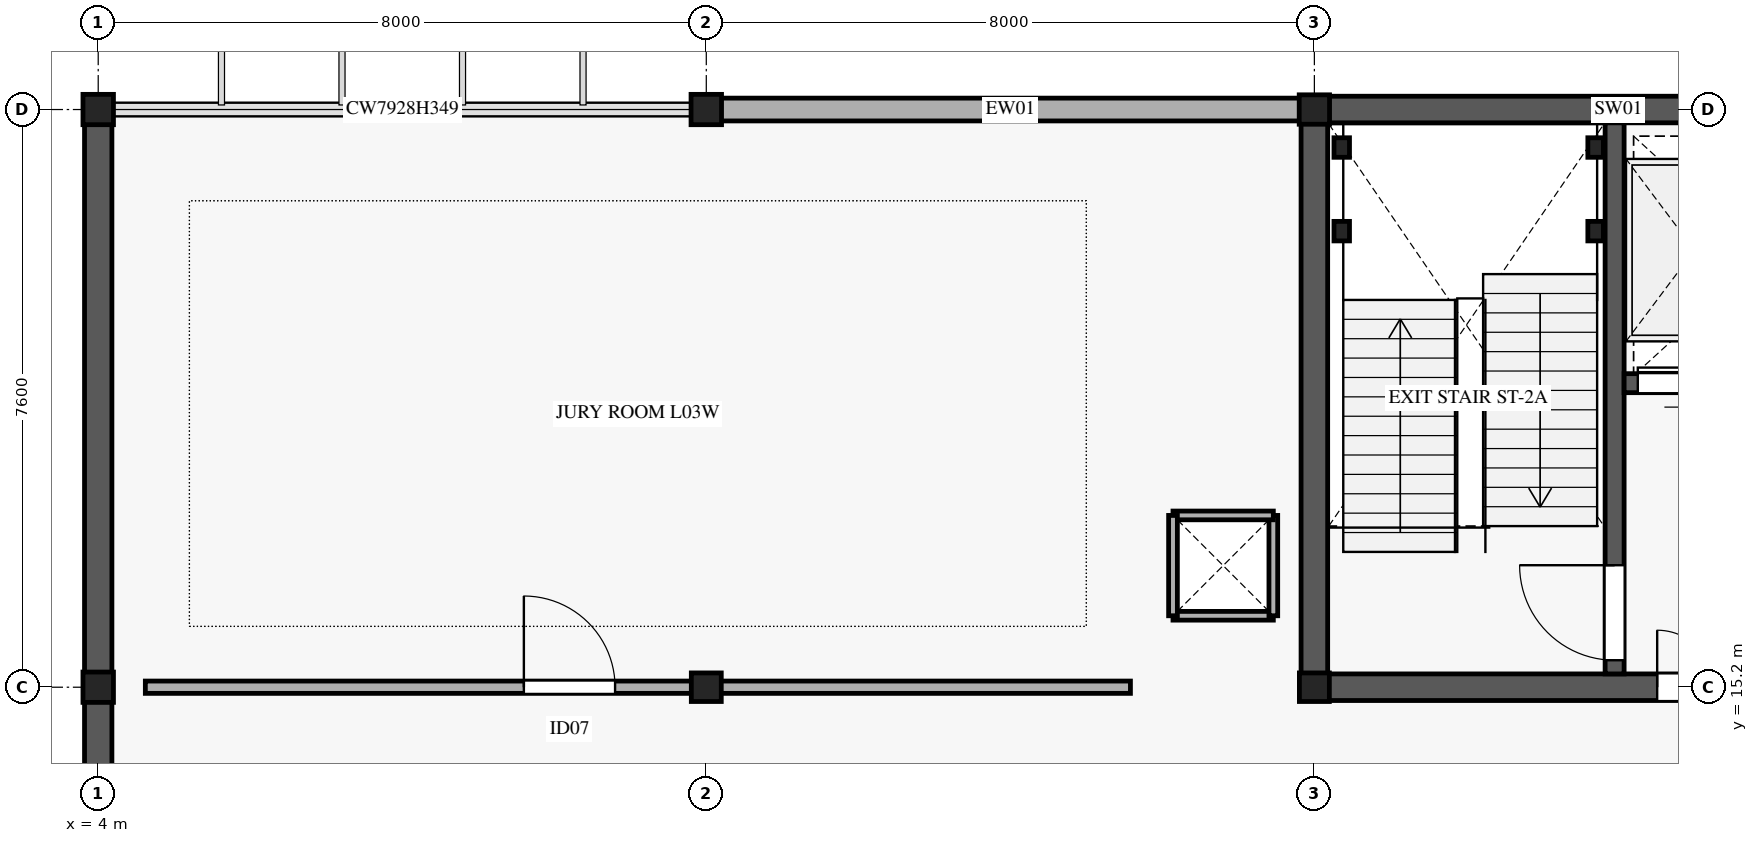
"""IFC4 building model, lengths in metres.
Left out: names, types, materials, properties, quantities, classifications, styles, units other than length and angle.
Written with IfcOpenShell. Run it as: python <this file> out.ifc"""

import sys

from ifc_helpers import new_model, si_unit, direction, frame, frame_2d, origin, origin_2d, place, context, subcontext, project, spatial, rectangle, i_section, extrude, element, fill, save


model = new_model("IFC4")
c1 = context("Model", 3, precision=1e-05, world=origin(), true_north=direction((0.0, 1.0)))
c2 = subcontext(c1, "Body", "Model", "MODEL_VIEW")
j1 = project(units=[si_unit("LENGTHUNIT", "METRE"), si_unit("PLANEANGLEUNIT", "RADIAN")], contexts=[c1])
p1 = place(None, origin())
s1 = spatial("IfcSite", under=j1, at=p1, CompositionType="ELEMENT")
p2 = place(p1, origin())
s2 = spatial("IfcBuilding", under=s1, at=p2, CompositionType="ELEMENT")
p3 = place(p2, frame((0.0, 0.0, 15.6)))
s3 = spatial("IfcBuildingStorey", under=s2, at=p3, CompositionType="ELEMENT", Elevation=15.6)
for number, where, z_axis, x_axis in (
    (1, (4.0, 15.2, 0.0), (0.0, 0.0, 1.0), (1.0, 0.0, 0.0)),
    (2, (4.0, 22.8, 0.0), (0.0, 0.0, 1.0), (1.0, 0.0, 0.0)),
):
    element("IfcColumn", number, at=place(p3, frame(where, z_axis=z_axis, x_axis=x_axis)), inside=s3, PredefinedType="COLUMN", context=c2, shape_type="SweptSolid", body=[
        extrude(i_section(OverallWidth=0.401, OverallDepth=0.399, WebThickness=0.025, FlangeThickness=0.04, FilletRadius=0.015, at=origin_2d()), origin(), (0.0, 0.0, 1.0), 4.59),
    ])
p4 = place(p3, frame((12.0, 15.2, 0.0), z_axis=(0.0, 0.0, 1.0), x_axis=(1.0, 0.0, 0.0)))
e3 = element("IfcColumn", 3, at=p4, inside=s3, PredefinedType="COLUMN", context=c2, shape_type="SweptSolid", body=[
    extrude(i_section(OverallWidth=0.394, OverallDepth=0.376, WebThickness=0.017, FlangeThickness=0.028, FilletRadius=0.015, at=origin_2d()), origin(), (0.0, 0.0, 1.0), 4.59),
])
p5 = place(p3, frame((12.0, 22.8, 0.0), z_axis=(0.0, 0.0, 1.0), x_axis=(1.0, 0.0, 0.0)))
e4 = element("IfcColumn", 4, at=p5, inside=s3, PredefinedType="COLUMN", context=c2, shape_type="SweptSolid", body=[
    extrude(i_section(OverallWidth=0.401, OverallDepth=0.399, WebThickness=0.025, FlangeThickness=0.04, FilletRadius=0.015, at=origin_2d()), origin(), (0.0, 0.0, 1.0), 4.59),
])
p6 = place(p3, frame((20.0, 15.2, 0.0), z_axis=(0.0, 0.0, 1.0), x_axis=(1.0, 0.0, 0.0)))
e5 = element("IfcColumn", 5, at=p6, inside=s3, PredefinedType="COLUMN", context=c2, shape_type="SweptSolid", body=[
    extrude(i_section(OverallWidth=0.394, OverallDepth=0.376, WebThickness=0.017, FlangeThickness=0.028, FilletRadius=0.015, at=origin_2d()), origin(), (0.0, 0.0, 1.0), 4.59),
])
p7 = place(p3, frame((20.0, 22.8, 0.0), z_axis=(0.0, 0.0, 1.0), x_axis=(1.0, 0.0, 0.0)))
e6 = element("IfcColumn", 6, at=p7, inside=s3, PredefinedType="COLUMN", context=c2, shape_type="SweptSolid", body=[
    extrude(i_section(OverallWidth=0.399, OverallDepth=0.387, WebThickness=0.021, FlangeThickness=0.033, FilletRadius=0.015, at=origin_2d()), origin(), (0.0, 0.0, 1.0), 4.59),
])
p8 = place(p3, frame((4.0, 7.58, 0.0), z_axis=(0.0, 0.0, 1.0), x_axis=(0.0, 1.0, 0.0)))
e7 = element("IfcWall", 7, at=p8, inside=s3, PredefinedType="STANDARD", context=c2, shape_type="SweptSolid", body=[
    extrude(rectangle(XDim=7.64, YDim=0.36, at=frame_2d((3.82, 0.0))), origin(), (0.0, 0.0, 1.0), 4.6),
])
p9 = place(p3, frame((4.0, 15.18, 0.0), z_axis=(0.0, 0.0, 1.0), x_axis=(0.0, 1.0, 0.0)))
e8 = element("IfcWall", 8, at=p9, inside=s3, PredefinedType="STANDARD", context=c2, shape_type="SweptSolid", body=[
    extrude(rectangle(XDim=7.64, YDim=0.36, at=frame_2d((3.82, 0.0))), origin(), (0.0, 0.0, 1.0), 4.6),
])
p10 = place(p3, frame((11.98, 22.8, 0.0), z_axis=(0.0, 0.0, 1.0), x_axis=(1.0, 0.0, 0.0)))
e9 = element("IfcWall", 9, at=p10, inside=s3, PredefinedType="STANDARD", context=c2, shape_type="SweptSolid", body=[
    extrude(rectangle(XDim=8.04, YDim=0.3, at=frame_2d((4.02, 0.0))), origin(), (0.0, 0.0, 1.0), 3.46),
])
for number, where, z_axis, x_axis in (
    (10, (18.14, 16.14, 0.0), (0.0, 0.0, 1.0), (1.0, 0.0, 0.0)),
    (11, (19.46, 16.14, 0.0), (0.0, 0.0, 1.0), (0.0, 1.0, 0.0)),
    (12, (19.46, 17.46, 0.0), (0.0, 0.0, 1.0), (-1.0, 0.0, 0.0)),
    (13, (18.14, 17.46, 0.0), (0.0, 0.0, 1.0), (0.0, -1.0, 0.0)),
):
    element("IfcWall", number, at=place(p3, frame(where, z_axis=z_axis, x_axis=x_axis)), inside=s3, PredefinedType="PARTITIONING", context=c2, shape_type="SweptSolid", body=[
        extrude(rectangle(XDim=1.32, YDim=0.115, at=frame_2d((0.66, 0.0))), origin(), (0.0, 0.0, 1.0), 3.75),
    ])
p11 = place(p3, frame((19.825, 15.2, 0.0), z_axis=(0.0, 0.0, 1.0), x_axis=(1.0, 0.0, 0.0)))
e14 = element("IfcWall", 14, at=p11, inside=s3, PredefinedType="SHEAR", context=c2, shape_type="SweptSolid", body=[
    extrude(rectangle(XDim=8.35, YDim=0.35, at=frame_2d((4.175, 0.0))), origin(), (0.0, 0.0, 1.0), 4.59),
])
p12 = place(p11, frame((4.685, 0.0, 0.0)))
e15 = element("IfcOpeningElement", 15, at=p12, cuts=e14, PredefinedType="OPENING", context=c2, shape_type="SweptSolid", body=[
    extrude(rectangle(XDim=1.5, YDim=2.2, at=frame_2d((0.75, 1.1))), frame((0.0, 0.185, 0.0), z_axis=(0.0, -1.0, 0.0), x_axis=(1.0, 0.0, 0.0)), (0.0, 0.0, 1.0), 0.37),
])
p13 = place(p3, frame((19.825, 22.8, 0.0), z_axis=(0.0, 0.0, 1.0), x_axis=(1.0, 0.0, 0.0)))
e16 = element("IfcWall", 16, at=p13, inside=s3, PredefinedType="SHEAR", context=c2, shape_type="SweptSolid", body=[
    extrude(rectangle(XDim=8.35, YDim=0.35, at=frame_2d((4.175, 0.0))), origin(), (0.0, 0.0, 1.0), 4.59),
])
p14 = place(p3, frame((20.0, 15.375, 0.0), z_axis=(0.0, 0.0, 1.0), x_axis=(0.0, 1.0, 0.0)))
e17 = element("IfcWall", 17, at=p14, inside=s3, PredefinedType="SHEAR", context=c2, shape_type="SweptSolid", body=[
    extrude(rectangle(XDim=7.25, YDim=0.35, at=frame_2d((3.625, 0.0))), origin(), (0.0, 0.0, 1.0), 4.59),
])
p15 = place(p3, frame((23.95, 15.375, 0.0), z_axis=(0.0, 0.0, 1.0), x_axis=(0.0, 1.0, 0.0)))
e18 = element("IfcWall", 18, at=p15, inside=s3, PredefinedType="SHEAR", context=c2, shape_type="SweptSolid", body=[
    extrude(rectangle(XDim=7.25, YDim=0.25, at=frame_2d((3.625, 0.0))), origin(), (0.0, 0.0, 1.0), 4.59),
])
p16 = place(p15, frame((0.18, 0.0, 0.0)))
e19 = element("IfcOpeningElement", 19, at=p16, cuts=e18, PredefinedType="OPENING", context=c2, shape_type="SweptSolid", body=[
    extrude(rectangle(XDim=1.25, YDim=2.2, at=frame_2d((0.625, 1.1))), frame((0.0, 0.135, 0.0), z_axis=(0.0, -1.0, 0.0), x_axis=(1.0, 0.0, 0.0)), (0.0, 0.0, 1.0), 0.27),
])
p17 = place(p3, frame((24.075, 19.2, 0.0), z_axis=(0.0, 0.0, 1.0), x_axis=(1.0, 0.0, 0.0)))
e20 = element("IfcWall", 20, at=p17, inside=s3, PredefinedType="SHEAR", context=c2, shape_type="SweptSolid", body=[
    extrude(rectangle(XDim=3.75, YDim=0.25, at=frame_2d((1.875, 0.0))), origin(), (0.0, 0.0, 1.0), 4.59),
])
p18 = place(p17, frame((0.18, 0.0, 0.0)))
e21 = element("IfcOpeningElement", 21, at=p18, cuts=e20, PredefinedType="OPENING", context=c2, shape_type="SweptSolid", body=[
    extrude(rectangle(XDim=1.2, YDim=2.2, at=frame_2d((0.6, 1.1))), frame((0.0, 0.135, 0.0), z_axis=(0.0, -1.0, 0.0), x_axis=(1.0, 0.0, 0.0)), (0.0, 0.0, 1.0), 0.27),
])
p19 = place(p17, frame((1.55, 0.0, 0.0)))
e22 = element("IfcOpeningElement", 22, at=p19, cuts=e20, PredefinedType="OPENING", context=c2, shape_type="SweptSolid", body=[
    extrude(rectangle(XDim=1.05, YDim=2.2, at=frame_2d((0.525, 1.1))), frame((0.0, 0.135, 0.0), z_axis=(0.0, -1.0, 0.0), x_axis=(1.0, 0.0, 0.0)), (0.0, 0.0, 1.0), 0.27),
])
for number, where, z_axis, x_axis in (
    (23, (20.36, 21.2, 0.0), (0.0, 0.0, 1.0), (1.0, 0.0, 0.0)),
    (24, (23.7, 21.2, 0.0), (0.0, 0.0, 1.0), (1.0, 0.0, 0.0)),
    (25, (20.36, 22.3, 0.0), (0.0, 0.0, 1.0), (1.0, 0.0, 0.0)),
    (26, (23.7, 22.3, 0.0), (0.0, 0.0, 1.0), (1.0, 0.0, 0.0)),
):
    element("IfcColumn", number, at=place(p3, frame(where, z_axis=z_axis, x_axis=x_axis)), inside=s3, PredefinedType="COLUMN", context=c2, shape_type="SweptSolid", body=[
        extrude(i_section(OverallWidth=0.204, OverallDepth=0.257, WebThickness=0.009, FlangeThickness=0.016, FilletRadius=0.013, at=origin_2d()), origin(), (0.0, 0.0, 1.0), 4.795),
    ])
p20 = place(p3, frame((4.62, 15.2, 0.0), z_axis=(0.0, 0.0, 1.0), x_axis=(1.0, 0.0, 0.0)))
e27 = element("IfcWall", 27, at=p20, inside=s3, PredefinedType="PARTITIONING", context=c2, shape_type="SweptSolid", body=[
    extrude(rectangle(XDim=12.96, YDim=0.162, at=frame_2d((6.48, 0.0))), origin(), (0.0, 0.0, 1.0), 3.45),
])
p21 = place(p20, frame((4.98, 0.0, 0.0)))
e28 = element("IfcOpeningElement", 28, at=p21, cuts=e27, PredefinedType="OPENING", context=c2, shape_type="SweptSolid", body=[
    extrude(rectangle(XDim=1.2, YDim=2.2, at=frame_2d((0.6, 1.1))), frame((0.0, 0.091, 0.0), z_axis=(0.0, -1.0, 0.0), x_axis=(1.0, 0.0, 0.0)), (0.0, 0.0, 1.0), 0.182),
])
p22 = place(p16, origin())
e29 = element("IfcDoor", 29, at=p22, inside=s3, OperationType="SINGLE_SWING_RIGHT", PredefinedType="DOOR", context=c2, shape_type="SweptSolid", body=[
    extrude(rectangle(XDim=1.25, YDim=2.2, at=frame_2d((0.625, 1.1))), frame((0.0, 0.025, 0.0), z_axis=(0.0, -1.0, 0.0), x_axis=(1.0, 0.0, 0.0)), (0.0, 0.0, 1.0), 0.05),
])
fill(e19, e29)
p23 = place(p12, origin())
e30 = element("IfcDoor", 30, at=p23, inside=s3, OperationType="DOUBLE_DOOR_SINGLE_SWING", PredefinedType="DOOR", context=c2, shape_type="SweptSolid", body=[
    extrude(rectangle(XDim=1.5, YDim=2.2, at=frame_2d((0.75, 1.1))), frame((0.0, 0.025, 0.0), z_axis=(0.0, -1.0, 0.0), x_axis=(1.0, 0.0, 0.0)), (0.0, 0.0, 1.0), 0.05),
])
fill(e15, e30)
p24 = place(p18, origin())
e31 = element("IfcDoor", 31, at=p24, inside=s3, OperationType="SLIDING_TO_LEFT", PredefinedType="DOOR", context=c2, shape_type="SweptSolid", body=[
    extrude(rectangle(XDim=1.2, YDim=2.2, at=frame_2d((0.6, 1.1))), frame((0.0, 0.025, 0.0), z_axis=(0.0, -1.0, 0.0), x_axis=(1.0, 0.0, 0.0)), (0.0, 0.0, 1.0), 0.05),
])
fill(e21, e31)
p25 = place(p21, origin())
e32 = element("IfcDoor", 32, at=p25, inside=s3, OperationType="SINGLE_SWING_LEFT", PredefinedType="DOOR", context=c2, shape_type="SweptSolid", body=[
    extrude(rectangle(XDim=1.2, YDim=2.2, at=frame_2d((0.6, 1.1))), frame((0.0, 0.025, 0.0), z_axis=(0.0, -1.0, 0.0), x_axis=(1.0, 0.0, 0.0)), (0.0, 0.0, 1.0), 0.05),
])
fill(e28, e32)
save(model, sys.argv[1])
